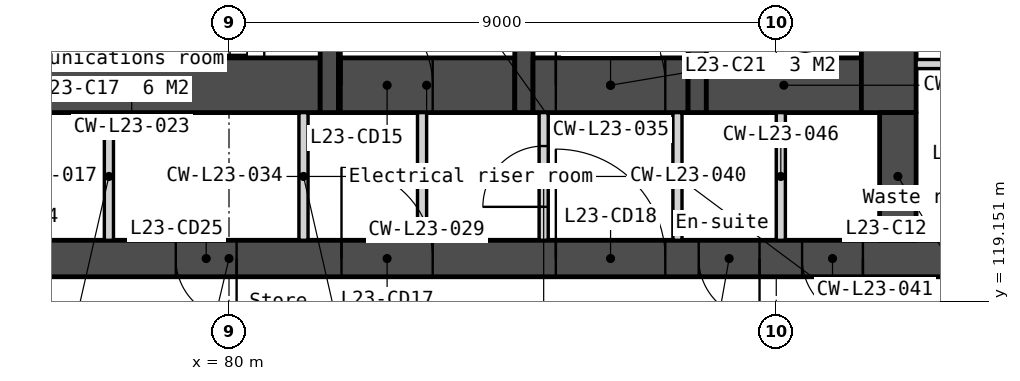
"""IFC4 building model, lengths in metres.
Left out: names, types, materials, properties, quantities, classifications, styles, units other than length and angle.
Written with IfcOpenShell. Run it as: python <this file> out.ifc"""

import sys

from ifc_helpers import new_model, si_unit, direction, frame, frame_2d, origin, place, context, subcontext, project, spatial, polyline, rectangle, outline, extrude, element, fill, save


model = new_model("IFC4")
c1 = context("Model", 3, precision=1e-05, world=origin(), true_north=direction((0.0, 1.0)))
c2 = subcontext(c1, "Body", "Model", "MODEL_VIEW")
j1 = project(units=[si_unit("LENGTHUNIT", "METRE"), si_unit("PLANEANGLEUNIT", "RADIAN")], contexts=[c1])
p1 = place(None, origin())
s1 = spatial("IfcSite", under=j1, at=p1, CompositionType="ELEMENT")
p2 = place(p1, origin())
s2 = spatial("IfcBuilding", under=s1, at=p2, CompositionType="ELEMENT")
p3 = place(p2, frame((0.0, 0.0, 95.8)))
s3 = spatial("IfcBuildingStorey", under=s2, at=p3, CompositionType="ELEMENT", Elevation=95.8)
p4 = place(p3, frame((66.0, 119.85, 0.0), z_axis=(0.0, 0.0, 1.0), x_axis=(1.0, 0.0, 0.0)))
e1 = element("IfcWall", 1, at=p4, inside=s3, PredefinedType="SOLIDWALL", context=c2, shape_type="SweptSolid", body=[
    extrude(rectangle(XDim=28.0, YDim=0.6, at=frame_2d((14.0, 0.0))), origin(), (0.0, 0.0, 1.0), 3.35),
])
p5 = place(p4, frame((6.825, 0.0, 0.0)))
e2 = element("IfcOpeningElement", 2, at=p5, cuts=e1, PredefinedType="OPENING", context=c2, shape_type="SweptSolid", body=[
    extrude(rectangle(XDim=1.8, YDim=2.1, at=frame_2d((0.9, 1.05))), frame((0.0, 0.31, 0.0), z_axis=(0.0, -1.0, 0.0), x_axis=(1.0, 0.0, 0.0)), (0.0, 0.0, 1.0), 0.62),
])
p6 = place(p4, frame((15.85, 0.0, 0.0)))
e3 = element("IfcOpeningElement", 3, at=p6, cuts=e1, PredefinedType="OPENING", context=c2, shape_type="SweptSolid", body=[
    extrude(rectangle(XDim=1.5, YDim=2.1, at=frame_2d((0.75, 1.05))), frame((0.0, 0.31, 0.0), z_axis=(0.0, -1.0, 0.0), x_axis=(1.0, 0.0, 0.0)), (0.0, 0.0, 1.0), 0.62),
])
p7 = place(p4, frame((19.375, 0.0, 0.0)))
e4 = element("IfcOpeningElement", 4, at=p7, cuts=e1, PredefinedType="OPENING", context=c2, shape_type="SweptSolid", body=[
    extrude(rectangle(XDim=1.8, YDim=2.1, at=frame_2d((0.9, 1.05))), frame((0.0, 0.31, 0.0), z_axis=(0.0, -1.0, 0.0), x_axis=(1.0, 0.0, 0.0)), (0.0, 0.0, 1.0), 0.62),
])
p8 = place(p4, frame((4.425, 0.0, 0.0)))
e5 = element("IfcOpeningElement", 5, at=p8, cuts=e1, PredefinedType="OPENING", context=c2, shape_type="SweptSolid", body=[
    extrude(rectangle(XDim=1.0, YDim=2.1, at=frame_2d((0.5, 1.05))), frame((0.0, 0.31, 0.0), z_axis=(0.0, -1.0, 0.0), x_axis=(1.0, 0.0, 0.0)), (0.0, 0.0, 1.0), 0.62),
])
p9 = place(p4, frame((9.925, 0.0, 0.0)))
e6 = element("IfcOpeningElement", 6, at=p9, cuts=e1, PredefinedType="OPENING", context=c2, shape_type="SweptSolid", body=[
    extrude(rectangle(XDim=1.0, YDim=2.1, at=frame_2d((0.5, 1.05))), frame((0.0, 0.31, 0.0), z_axis=(0.0, -1.0, 0.0), x_axis=(1.0, 0.0, 0.0)), (0.0, 0.0, 1.0), 0.62),
])
p10 = place(p4, frame((13.125, 0.0, 0.0)))
e7 = element("IfcOpeningElement", 7, at=p10, cuts=e1, PredefinedType="OPENING", context=c2, shape_type="SweptSolid", body=[
    extrude(rectangle(XDim=1.0, YDim=2.1, at=frame_2d((0.5, 1.05))), frame((0.0, 0.31, 0.0), z_axis=(0.0, -1.0, 0.0), x_axis=(1.0, 0.0, 0.0)), (0.0, 0.0, 1.0), 0.62),
])
p11 = place(p4, frame((21.725, 0.0, 0.0)))
e8 = element("IfcOpeningElement", 8, at=p11, cuts=e1, PredefinedType="OPENING", context=c2, shape_type="SweptSolid", body=[
    extrude(rectangle(XDim=1.0, YDim=2.1, at=frame_2d((0.5, 1.05))), frame((0.0, 0.31, 0.0), z_axis=(0.0, -1.0, 0.0), x_axis=(1.0, 0.0, 0.0)), (0.0, 0.0, 1.0), 0.62),
])
p12 = place(p4, frame((23.425, 0.0, 0.0)))
e9 = element("IfcOpeningElement", 9, at=p12, cuts=e1, PredefinedType="OPENING", context=c2, shape_type="SweptSolid", body=[
    extrude(rectangle(XDim=1.0, YDim=2.1, at=frame_2d((0.5, 1.05))), frame((0.0, 0.31, 0.0), z_axis=(0.0, -1.0, 0.0), x_axis=(1.0, 0.0, 0.0)), (0.0, 0.0, 1.0), 0.62),
])
p13 = place(p3, frame((75.3, 122.7, 0.0), z_axis=(0.0, 0.0, 1.0), x_axis=(1.0, 0.0, 0.0)))
e10 = element("IfcWall", 10, at=p13, inside=s3, PredefinedType="SOLIDWALL", context=c2, shape_type="SweptSolid", body=[
    extrude(rectangle(XDim=6.2, YDim=0.9, at=frame_2d((3.1, 0.0))), origin(), (0.0, 0.0, 1.0), 3.35),
])
for number, where, z_axis, x_axis in (
    (11, (78.025, 122.25, 0.0), (0.0, 0.0, 1.0), (0.0, -1.0, 0.0)),
    (12, (81.225, 122.25, 0.0), (0.0, 0.0, 1.0), (0.0, -1.0, 0.0)),
):
    element("IfcWall", number, at=place(p3, frame(where, z_axis=z_axis, x_axis=x_axis)), inside=s3, PredefinedType="PARTITIONING", context=c2, shape_type="SweptSolid", body=[
        extrude(rectangle(XDim=2.1, YDim=0.15, at=frame_2d((1.05, 0.0))), origin(), (0.0, 0.0, 1.0), 3.35),
    ])
p14 = place(p3, frame((81.65, 125.7, 0.0), z_axis=(0.0, 0.0, 1.0), x_axis=(0.0, -1.0, 0.0)))
e13 = element("IfcWall", 13, at=p14, inside=s3, PredefinedType="SOLIDWALL", context=c2, shape_type="SweptSolid", body=[
    extrude(rectangle(XDim=3.45, YDim=0.3, at=frame_2d((1.725, 0.0))), origin(), (0.0, 0.0, 1.0), 3.35),
])
p15 = place(p14, frame((0.75, 0.0, 0.0)))
e14 = element("IfcOpeningElement", 14, at=p15, cuts=e13, PredefinedType="OPENING", context=c2, shape_type="SweptSolid", body=[
    extrude(rectangle(XDim=1.0, YDim=2.1, at=frame_2d((0.5, 1.05))), frame((0.0, 0.16, 0.0), z_axis=(0.0, -1.0, 0.0), x_axis=(1.0, 0.0, 0.0)), (0.0, 0.0, 1.0), 0.32),
])
p16 = place(p3, frame((81.8, 122.7, 0.0), z_axis=(0.0, 0.0, 1.0), x_axis=(1.0, 0.0, 0.0)))
e15 = element("IfcWall", 15, at=p16, inside=s3, PredefinedType="SOLIDWALL", context=c2, shape_type="SweptSolid", body=[
    extrude(rectangle(XDim=2.9, YDim=0.9, at=frame_2d((1.45, 0.0))), origin(), (0.0, 0.0, 1.0), 3.35),
])
p17 = place(p16, frame((0.05, 0.0, 0.0)))
e16 = element("IfcOpeningElement", 16, at=p17, cuts=e15, PredefinedType="OPENING", context=c2, shape_type="SweptSolid", body=[
    extrude(rectangle(XDim=1.5, YDim=2.1, at=frame_2d((0.75, 1.05))), frame((0.0, 0.46, 0.0), z_axis=(0.0, -1.0, 0.0), x_axis=(1.0, 0.0, 0.0)), (0.0, 0.0, 1.0), 0.92),
])
p18 = place(p3, frame((83.175, 122.25, 0.0), z_axis=(0.0, 0.0, 1.0), x_axis=(0.0, -1.0, 0.0)))
e17 = element("IfcWall", 17, at=p18, inside=s3, PredefinedType="PARTITIONING", context=c2, shape_type="SweptSolid", body=[
    extrude(rectangle(XDim=2.1, YDim=0.15, at=frame_2d((1.05, 0.0))), origin(), (0.0, 0.0, 1.0), 3.35),
])
p19 = place(p3, frame((84.85, 133.95, 0.0), z_axis=(0.0, 0.0, 1.0), x_axis=(0.0, -1.0, 0.0)))
e18 = element("IfcWall", 18, at=p19, inside=s3, PredefinedType="SOLIDWALL", context=c2, shape_type="SweptSolid", body=[
    extrude(rectangle(XDim=11.7, YDim=0.3, at=frame_2d((5.85, 0.0))), origin(), (0.0, 0.0, 1.0), 3.35),
])
p20 = place(p3, frame((85.0, 122.7, 0.0), z_axis=(0.0, 0.0, 1.0), x_axis=(1.0, 0.0, 0.0)))
e19 = element("IfcWall", 19, at=p20, inside=s3, PredefinedType="SOLIDWALL", context=c2, shape_type="SweptSolid", body=[
    extrude(rectangle(XDim=2.55, YDim=0.9, at=frame_2d((1.275, 0.0))), origin(), (0.0, 0.0, 1.0), 3.35),
])
p21 = place(p20, frame((0.375, 0.0, 0.0)))
e20 = element("IfcOpeningElement", 20, at=p21, cuts=e19, PredefinedType="OPENING", context=c2, shape_type="SweptSolid", body=[
    extrude(rectangle(XDim=1.8, YDim=2.1, at=frame_2d((0.9, 1.05))), frame((0.0, 0.46, 0.0), z_axis=(0.0, -1.0, 0.0), x_axis=(1.0, 0.0, 0.0)), (0.0, 0.0, 1.0), 0.92),
])
p22 = place(p3, frame((85.175, 122.25, 0.0), z_axis=(0.0, 0.0, 1.0), x_axis=(0.0, -1.0, 0.0)))
e21 = element("IfcWall", 21, at=p22, inside=s3, PredefinedType="PARTITIONING", context=c2, shape_type="SweptSolid", body=[
    extrude(rectangle(XDim=2.1, YDim=0.15, at=frame_2d((1.05, 0.0))), origin(), (0.0, 0.0, 1.0), 3.35),
])
p23 = place(p22, frame((0.55, 0.0, 0.0)))
e22 = element("IfcOpeningElement", 22, at=p23, cuts=e21, PredefinedType="OPENING", context=c2, shape_type="SweptSolid", body=[
    extrude(rectangle(XDim=1.0, YDim=2.1, at=frame_2d((0.5, 1.05))), frame((0.0, 0.085, 0.0), z_axis=(0.0, -1.0, 0.0), x_axis=(1.0, 0.0, 0.0)), (0.0, 0.0, 1.0), 0.17),
])
p24 = place(p3, frame((87.375, 122.25, 0.0), z_axis=(0.0, 0.0, 1.0), x_axis=(0.0, -1.0, 0.0)))
e23 = element("IfcWall", 23, at=p24, inside=s3, PredefinedType="PARTITIONING", context=c2, shape_type="SweptSolid", body=[
    extrude(rectangle(XDim=2.1, YDim=0.15, at=frame_2d((1.05, 0.0))), origin(), (0.0, 0.0, 1.0), 3.35),
])
p25 = place(p3, frame((87.7, 133.95, 0.0), z_axis=(0.0, 0.0, 1.0), x_axis=(0.0, -1.0, 0.0)))
e24 = element("IfcWall", 24, at=p25, inside=s3, PredefinedType="SOLIDWALL", context=c2, shape_type="SweptSolid", body=[
    extrude(rectangle(XDim=11.7, YDim=0.3, at=frame_2d((5.85, 0.0))), origin(), (0.0, 0.0, 1.0), 3.35),
])
p26 = place(p25, frame((6.95, 0.0, 0.0)))
e25 = element("IfcOpeningElement", 25, at=p26, cuts=e24, PredefinedType="OPENING", context=c2, shape_type="SweptSolid", body=[
    extrude(rectangle(XDim=1.1, YDim=2.1, at=frame_2d((0.55, 1.05))), frame((0.0, 0.16, 0.0), z_axis=(0.0, -1.0, 0.0), x_axis=(1.0, 0.0, 0.0)), (0.0, 0.0, 1.0), 0.32),
])
p27 = place(p25, frame((5.1, 0.0, 0.0)))
e26 = element("IfcOpeningElement", 26, at=p27, cuts=e24, PredefinedType="OPENING", context=c2, shape_type="SweptSolid", body=[
    extrude(rectangle(XDim=1.0, YDim=2.1, at=frame_2d((0.5, 1.05))), frame((0.0, 0.16, 0.0), z_axis=(0.0, -1.0, 0.0), x_axis=(1.0, 0.0, 0.0)), (0.0, 0.0, 1.0), 0.32),
])
p28 = place(p25, frame((9.25, 0.0, 0.0)))
e27 = element("IfcOpeningElement", 27, at=p28, cuts=e24, PredefinedType="OPENING", context=c2, shape_type="SweptSolid", body=[
    extrude(rectangle(XDim=1.1, YDim=2.1, at=frame_2d((0.55, 1.05))), frame((0.0, 0.16, 0.0), z_axis=(0.0, -1.0, 0.0), x_axis=(1.0, 0.0, 0.0)), (0.0, 0.0, 1.0), 0.32),
])
p29 = place(p3, frame((87.85, 122.7, 0.0), z_axis=(0.0, 0.0, 1.0), x_axis=(1.0, 0.0, 0.0)))
e28 = element("IfcWall", 28, at=p29, inside=s3, PredefinedType="SOLIDWALL", context=c2, shape_type="SweptSolid", body=[
    extrude(rectangle(XDim=2.55, YDim=0.9, at=frame_2d((1.275, 0.0))), origin(), (0.0, 0.0, 1.0), 3.35),
])
p30 = place(p3, frame((89.075, 122.25, 0.0), z_axis=(0.0, 0.0, 1.0), x_axis=(0.0, -1.0, 0.0)))
e29 = element("IfcWall", 29, at=p30, inside=s3, PredefinedType="PARTITIONING", context=c2, shape_type="SweptSolid", body=[
    extrude(rectangle(XDim=2.1, YDim=0.15, at=frame_2d((1.05, 0.0))), origin(), (0.0, 0.0, 1.0), 3.35),
])
p31 = place(p3, frame((90.85, 133.95, 0.0), z_axis=(0.0, 0.0, 1.0), x_axis=(0.0, -1.0, 0.0)))
e30 = element("IfcWall", 30, at=p31, inside=s3, PredefinedType="SOLIDWALL", context=c2, shape_type="SweptSolid", body=[
    extrude(rectangle(XDim=11.7, YDim=0.9, at=frame_2d((5.85, 0.0))), origin(), (0.0, 0.0, 1.0), 3.35),
])
p32 = place(p3, frame((91.0, 122.25, 0.0), z_axis=(0.0, 0.0, 1.0), x_axis=(0.0, -1.0, 0.0)))
e31 = element("IfcWall", 31, at=p32, inside=s3, PredefinedType="SOLIDWALL", context=c2, shape_type="SweptSolid", body=[
    extrude(rectangle(XDim=2.1, YDim=0.6, at=frame_2d((1.05, 0.0))), origin(), (0.0, 0.0, 1.0), 3.35),
])
p33 = place(p3, frame((91.3, 123.049, 0.0), z_axis=(0.0, 0.0, 1.0), x_axis=(1.0, 0.0, 0.0)))
e32 = element("IfcWall", 32, at=p33, inside=s3, PredefinedType="PARTITIONING", context=c2, shape_type="SweptSolid", body=[
    extrude(rectangle(XDim=2.1, YDim=0.15, at=frame_2d((1.05, 0.0))), origin(), (0.0, 0.0, 1.0), 3.35),
])
p34 = place(p3, frame((56.073, 130.263, -0.15), z_axis=(0.0, 0.0, 1.0), x_axis=(0.500000478905, -0.866025127289, 0.0)))
e33 = element("IfcWall", 33, at=p34, inside=s3, PredefinedType="SOLIDWALL", context=c2, shape_type="SweptSolid", body=[
    extrude(outline(polyline([(42.643, 0.0), (42.643, 3.5), (0.0, 3.5), (0.0, 0.0), (42.643, 0.0)])), frame((0.0, 0.225, 0.0), z_axis=(0.0, -1.0, 0.0), x_axis=(1.0, 0.0, 0.0)), (0.0, 0.0, 1.0), 0.45),
])
p35 = place(p34, frame((2.814, 0.0, 1.05)))
e34 = element("IfcOpeningElement", 34, at=p35, cuts=e33, PredefinedType="OPENING", context=c2, shape_type="SweptSolid", body=[
    extrude(rectangle(XDim=1.2, YDim=1.5, at=frame_2d((0.6, 0.75))), frame((0.0, 0.235, 0.0), z_axis=(0.0, -1.0, 0.0), x_axis=(1.0, 0.0, 0.0)), (0.0, 0.0, 1.0), 0.47),
])
p36 = place(p34, frame((4.514, 0.0, 1.05)))
e35 = element("IfcOpeningElement", 35, at=p36, cuts=e33, PredefinedType="OPENING", context=c2, shape_type="SweptSolid", body=[
    extrude(rectangle(XDim=1.2, YDim=1.5, at=frame_2d((0.6, 0.75))), frame((0.0, 0.235, 0.0), z_axis=(0.0, -1.0, 0.0), x_axis=(1.0, 0.0, 0.0)), (0.0, 0.0, 1.0), 0.47),
])
p37 = place(p34, frame((11.343, 0.0, 1.05)))
e36 = element("IfcOpeningElement", 36, at=p37, cuts=e33, PredefinedType="OPENING", context=c2, shape_type="SweptSolid", body=[
    extrude(rectangle(XDim=1.2, YDim=1.5, at=frame_2d((0.6, 0.75))), frame((0.0, 0.235, 0.0), z_axis=(0.0, -1.0, 0.0), x_axis=(1.0, 0.0, 0.0)), (0.0, 0.0, 1.0), 0.47),
])
p38 = place(p34, frame((13.043, 0.0, 1.05)))
e37 = element("IfcOpeningElement", 37, at=p38, cuts=e33, PredefinedType="OPENING", context=c2, shape_type="SweptSolid", body=[
    extrude(rectangle(XDim=1.2, YDim=1.5, at=frame_2d((0.6, 0.75))), frame((0.0, 0.235, 0.0), z_axis=(0.0, -1.0, 0.0), x_axis=(1.0, 0.0, 0.0)), (0.0, 0.0, 1.0), 0.47),
])
p39 = place(p34, frame((19.872, 0.0, 1.05)))
e38 = element("IfcOpeningElement", 38, at=p39, cuts=e33, PredefinedType="OPENING", context=c2, shape_type="SweptSolid", body=[
    extrude(rectangle(XDim=1.2, YDim=1.5, at=frame_2d((0.6, 0.75))), frame((0.0, 0.235, 0.0), z_axis=(0.0, -1.0, 0.0), x_axis=(1.0, 0.0, 0.0)), (0.0, 0.0, 1.0), 0.47),
])
p40 = place(p34, frame((21.572, 0.0, 1.05)))
e39 = element("IfcOpeningElement", 39, at=p40, cuts=e33, PredefinedType="OPENING", context=c2, shape_type="SweptSolid", body=[
    extrude(rectangle(XDim=1.2, YDim=1.5, at=frame_2d((0.6, 0.75))), frame((0.0, 0.235, 0.0), z_axis=(0.0, -1.0, 0.0), x_axis=(1.0, 0.0, 0.0)), (0.0, 0.0, 1.0), 0.47),
])
p41 = place(p34, frame((28.4, 0.0, 1.05)))
e40 = element("IfcOpeningElement", 40, at=p41, cuts=e33, PredefinedType="OPENING", context=c2, shape_type="SweptSolid", body=[
    extrude(rectangle(XDim=1.2, YDim=1.5, at=frame_2d((0.6, 0.75))), frame((0.0, 0.235, 0.0), z_axis=(0.0, -1.0, 0.0), x_axis=(1.0, 0.0, 0.0)), (0.0, 0.0, 1.0), 0.47),
])
p42 = place(p34, frame((30.1, 0.0, 1.05)))
e41 = element("IfcOpeningElement", 41, at=p42, cuts=e33, PredefinedType="OPENING", context=c2, shape_type="SweptSolid", body=[
    extrude(rectangle(XDim=1.2, YDim=1.5, at=frame_2d((0.6, 0.75))), frame((0.0, 0.235, 0.0), z_axis=(0.0, -1.0, 0.0), x_axis=(1.0, 0.0, 0.0)), (0.0, 0.0, 1.0), 0.47),
])
p43 = place(p34, frame((36.929, 0.0, 1.05)))
e42 = element("IfcOpeningElement", 42, at=p43, cuts=e33, PredefinedType="OPENING", context=c2, shape_type="SweptSolid", body=[
    extrude(rectangle(XDim=1.2, YDim=1.5, at=frame_2d((0.6, 0.75))), frame((0.0, 0.235, 0.0), z_axis=(0.0, -1.0, 0.0), x_axis=(1.0, 0.0, 0.0)), (0.0, 0.0, 1.0), 0.47),
])
p44 = place(p34, frame((38.629, 0.0, 1.05)))
e43 = element("IfcOpeningElement", 43, at=p44, cuts=e33, PredefinedType="OPENING", context=c2, shape_type="SweptSolid", body=[
    extrude(rectangle(XDim=1.2, YDim=1.5, at=frame_2d((0.6, 0.75))), frame((0.0, 0.235, 0.0), z_axis=(0.0, -1.0, 0.0), x_axis=(1.0, 0.0, 0.0)), (0.0, 0.0, 1.0), 0.47),
])
p45 = place(p3, frame((82.605, 93.333, -0.15), z_axis=(0.0, 0.0, 1.0), x_axis=(0.500000478905, 0.866025127289, 0.0)))
e44 = element("IfcWall", 44, at=p45, inside=s3, PredefinedType="SOLIDWALL", context=c2, shape_type="SweptSolid", body=[
    extrude(outline(polyline([(42.643, 0.0), (42.643, 3.5), (0.0, 3.5), (0.0, 0.0), (42.643, 0.0)])), frame((0.0, 0.225, 0.0), z_axis=(0.0, -1.0, 0.0), x_axis=(1.0, 0.0, 0.0)), (0.0, 0.0, 1.0), 0.45),
])
p46 = place(p45, frame((2.814, 0.0, 1.05)))
e45 = element("IfcOpeningElement", 45, at=p46, cuts=e44, PredefinedType="OPENING", context=c2, shape_type="SweptSolid", body=[
    extrude(rectangle(XDim=1.2, YDim=1.5, at=frame_2d((0.6, 0.75))), frame((0.0, 0.235, 0.0), z_axis=(0.0, -1.0, 0.0), x_axis=(1.0, 0.0, 0.0)), (0.0, 0.0, 1.0), 0.47),
])
p47 = place(p45, frame((4.514, 0.0, 1.05)))
e46 = element("IfcOpeningElement", 46, at=p47, cuts=e44, PredefinedType="OPENING", context=c2, shape_type="SweptSolid", body=[
    extrude(rectangle(XDim=1.2, YDim=1.5, at=frame_2d((0.6, 0.75))), frame((0.0, 0.235, 0.0), z_axis=(0.0, -1.0, 0.0), x_axis=(1.0, 0.0, 0.0)), (0.0, 0.0, 1.0), 0.47),
])
p48 = place(p45, frame((11.343, 0.0, 1.05)))
e47 = element("IfcOpeningElement", 47, at=p48, cuts=e44, PredefinedType="OPENING", context=c2, shape_type="SweptSolid", body=[
    extrude(rectangle(XDim=1.2, YDim=1.5, at=frame_2d((0.6, 0.75))), frame((0.0, 0.235, 0.0), z_axis=(0.0, -1.0, 0.0), x_axis=(1.0, 0.0, 0.0)), (0.0, 0.0, 1.0), 0.47),
])
p49 = place(p45, frame((13.043, 0.0, 1.05)))
e48 = element("IfcOpeningElement", 48, at=p49, cuts=e44, PredefinedType="OPENING", context=c2, shape_type="SweptSolid", body=[
    extrude(rectangle(XDim=1.2, YDim=1.5, at=frame_2d((0.6, 0.75))), frame((0.0, 0.235, 0.0), z_axis=(0.0, -1.0, 0.0), x_axis=(1.0, 0.0, 0.0)), (0.0, 0.0, 1.0), 0.47),
])
p50 = place(p45, frame((19.872, 0.0, 1.05)))
e49 = element("IfcOpeningElement", 49, at=p50, cuts=e44, PredefinedType="OPENING", context=c2, shape_type="SweptSolid", body=[
    extrude(rectangle(XDim=1.2, YDim=1.5, at=frame_2d((0.6, 0.75))), frame((0.0, 0.235, 0.0), z_axis=(0.0, -1.0, 0.0), x_axis=(1.0, 0.0, 0.0)), (0.0, 0.0, 1.0), 0.47),
])
p51 = place(p45, frame((21.572, 0.0, 1.05)))
e50 = element("IfcOpeningElement", 50, at=p51, cuts=e44, PredefinedType="OPENING", context=c2, shape_type="SweptSolid", body=[
    extrude(rectangle(XDim=1.2, YDim=1.5, at=frame_2d((0.6, 0.75))), frame((0.0, 0.235, 0.0), z_axis=(0.0, -1.0, 0.0), x_axis=(1.0, 0.0, 0.0)), (0.0, 0.0, 1.0), 0.47),
])
p52 = place(p45, frame((28.4, 0.0, 1.05)))
e51 = element("IfcOpeningElement", 51, at=p52, cuts=e44, PredefinedType="OPENING", context=c2, shape_type="SweptSolid", body=[
    extrude(rectangle(XDim=1.2, YDim=1.5, at=frame_2d((0.6, 0.75))), frame((0.0, 0.235, 0.0), z_axis=(0.0, -1.0, 0.0), x_axis=(1.0, 0.0, 0.0)), (0.0, 0.0, 1.0), 0.47),
])
p53 = place(p45, frame((30.1, 0.0, 1.05)))
e52 = element("IfcOpeningElement", 52, at=p53, cuts=e44, PredefinedType="OPENING", context=c2, shape_type="SweptSolid", body=[
    extrude(rectangle(XDim=1.2, YDim=1.5, at=frame_2d((0.6, 0.75))), frame((0.0, 0.235, 0.0), z_axis=(0.0, -1.0, 0.0), x_axis=(1.0, 0.0, 0.0)), (0.0, 0.0, 1.0), 0.47),
])
p54 = place(p45, frame((36.929, 0.0, 1.05)))
e53 = element("IfcOpeningElement", 53, at=p54, cuts=e44, PredefinedType="OPENING", context=c2, shape_type="SweptSolid", body=[
    extrude(rectangle(XDim=1.2, YDim=1.5, at=frame_2d((0.6, 0.75))), frame((0.0, 0.235, 0.0), z_axis=(0.0, -1.0, 0.0), x_axis=(1.0, 0.0, 0.0)), (0.0, 0.0, 1.0), 0.47),
])
p55 = place(p45, frame((38.629, 0.0, 1.05)))
e54 = element("IfcOpeningElement", 54, at=p55, cuts=e44, PredefinedType="OPENING", context=c2, shape_type="SweptSolid", body=[
    extrude(rectangle(XDim=1.2, YDim=1.5, at=frame_2d((0.6, 0.75))), frame((0.0, 0.235, 0.0), z_axis=(0.0, -1.0, 0.0), x_axis=(1.0, 0.0, 0.0)), (0.0, 0.0, 1.0), 0.47),
])
p56 = place(p21, origin())
e55 = element("IfcDoor", 55, at=p56, inside=s3, OperationType="DOUBLE_DOOR_DOUBLE_SWING", PredefinedType="DOOR", context=c2, shape_type="SweptSolid", body=[
    extrude(rectangle(XDim=1.8, YDim=2.1, at=frame_2d((0.9, 1.05))), frame((0.0, 0.025, 0.0), z_axis=(0.0, -1.0, 0.0), x_axis=(1.0, 0.0, 0.0)), (0.0, 0.0, 1.0), 0.05),
])
fill(e20, e55)
p57 = place(p17, origin())
e56 = element("IfcDoor", 56, at=p57, inside=s3, OperationType="DOUBLE_DOOR_DOUBLE_SWING", PredefinedType="DOOR", context=c2, shape_type="SweptSolid", body=[
    extrude(rectangle(XDim=1.5, YDim=2.1, at=frame_2d((0.75, 1.05))), frame((0.0, 0.025, 0.0), z_axis=(0.0, -1.0, 0.0), x_axis=(1.0, 0.0, 0.0)), (0.0, 0.0, 1.0), 0.05),
])
fill(e16, e56)
p58 = place(p6, origin())
e57 = element("IfcDoor", 57, at=p58, inside=s3, OperationType="DOUBLE_DOOR_DOUBLE_SWING", PredefinedType="DOOR", context=c2, shape_type="SweptSolid", body=[
    extrude(rectangle(XDim=1.5, YDim=2.1, at=frame_2d((0.75, 1.05))), frame((0.0, 0.025, 0.0), z_axis=(0.0, -1.0, 0.0), x_axis=(1.0, 0.0, 0.0)), (0.0, 0.0, 1.0), 0.05),
])
fill(e3, e57)
p59 = place(p7, origin())
e58 = element("IfcDoor", 58, at=p59, inside=s3, OperationType="DOUBLE_DOOR_DOUBLE_SWING", PredefinedType="DOOR", context=c2, shape_type="SweptSolid", body=[
    extrude(rectangle(XDim=1.8, YDim=2.1, at=frame_2d((0.9, 1.05))), frame((0.0, 0.025, 0.0), z_axis=(0.0, -1.0, 0.0), x_axis=(1.0, 0.0, 0.0)), (0.0, 0.0, 1.0), 0.05),
])
fill(e4, e58)
p60 = place(p10, origin())
e59 = element("IfcDoor", 59, at=p60, inside=s3, OperationType="SINGLE_SWING_RIGHT", PredefinedType="DOOR", context=c2, shape_type="SweptSolid", body=[
    extrude(rectangle(XDim=1.0, YDim=2.1, at=frame_2d((0.5, 1.05))), frame((0.0, 0.025, 0.0), z_axis=(0.0, -1.0, 0.0), x_axis=(1.0, 0.0, 0.0)), (0.0, 0.0, 1.0), 0.05),
])
fill(e7, e59)
p61 = place(p23, origin())
e60 = element("IfcDoor", 60, at=p61, inside=s3, OperationType="SINGLE_SWING_RIGHT", PredefinedType="DOOR", context=c2, shape_type="SweptSolid", body=[
    extrude(rectangle(XDim=1.0, YDim=2.1, at=frame_2d((0.5, 1.05))), frame((0.0, 0.025, 0.0), z_axis=(0.0, -1.0, 0.0), x_axis=(1.0, 0.0, 0.0)), (0.0, 0.0, 1.0), 0.05),
])
fill(e22, e60)
p62 = place(p11, origin())
e61 = element("IfcDoor", 61, at=p62, inside=s3, OperationType="SINGLE_SWING_RIGHT", PredefinedType="DOOR", context=c2, shape_type="SweptSolid", body=[
    extrude(rectangle(XDim=1.0, YDim=2.1, at=frame_2d((0.5, 1.05))), frame((0.0, 0.025, 0.0), z_axis=(0.0, -1.0, 0.0), x_axis=(1.0, 0.0, 0.0)), (0.0, 0.0, 1.0), 0.05),
])
fill(e8, e61)
p63 = place(p12, origin())
e62 = element("IfcDoor", 62, at=p63, inside=s3, OperationType="SINGLE_SWING_RIGHT", PredefinedType="DOOR", context=c2, shape_type="SweptSolid", body=[
    extrude(rectangle(XDim=1.0, YDim=2.1, at=frame_2d((0.5, 1.05))), frame((0.0, 0.025, 0.0), z_axis=(0.0, -1.0, 0.0), x_axis=(1.0, 0.0, 0.0)), (0.0, 0.0, 1.0), 0.05),
])
fill(e9, e62)
save(model, sys.argv[1])
